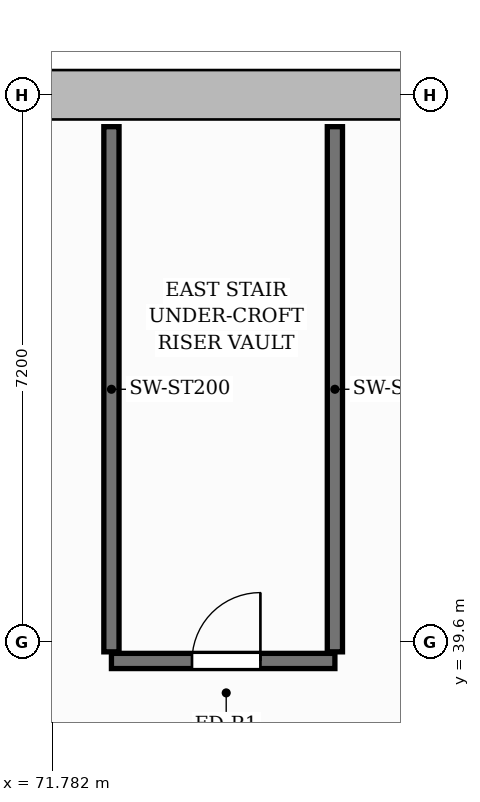
"""IFC4 building model, lengths in metres.
Left out: names, types, materials, properties, quantities, classifications, styles, units other than length and angle.
Written with IfcOpenShell. Run it as: python <this file> out.ifc"""

import sys

from ifc_helpers import new_model, si_unit, direction, frame, frame_2d, origin, place, context, subcontext, project, spatial, rectangle, extrude, source, transform, mapped, element, fill, save


model = new_model("IFC4")
c1 = context("Model", 3, precision=1e-05, world=origin(), true_north=direction((0.0, 1.0)))
c2 = subcontext(c1, "Body", "Model", "MODEL_VIEW")
j1 = project(units=[si_unit("LENGTHUNIT", "METRE"), si_unit("PLANEANGLEUNIT", "RADIAN")], contexts=[c1])
p1 = place(None, origin())
s1 = spatial("IfcSite", under=j1, at=p1, CompositionType="ELEMENT")
p2 = place(p1, origin())
s2 = spatial("IfcBuilding", under=s1, at=p2, CompositionType="ELEMENT")
p3 = place(p2, frame((0.0, 0.0, -13.0)))
s3 = spatial("IfcBuildingStorey", under=s2, at=p3, CompositionType="ELEMENT", Elevation=-13.0)
p4 = place(p3, frame((80.4, 46.8, -0.4), z_axis=(0.0, 0.0, 1.0), x_axis=(-1.0, 0.0, 0.0)))
e1 = element("IfcWall", 1, at=p4, inside=s3, PredefinedType="USERDEFINED", context=c2, shape_type="SweptSolid", body=[
    extrude(rectangle(XDim=85.2, YDim=0.65, at=frame_2d((42.6, 0.0))), origin(), (0.0, 0.0, 1.0), 6.9),
])
for number, where, z_axis, x_axis in (
    (2, (72.56, 39.47, -0.4), (0.0, 0.0, 1.0), (0.0, 1.0, 0.0)),
    (3, (75.5, 39.47, -0.4), (0.0, 0.0, 1.0), (0.0, 1.0, 0.0)),
):
    element("IfcWall", number, at=place(p3, frame(where, z_axis=z_axis, x_axis=x_axis)), inside=s3, PredefinedType="SHEAR", context=c2, shape_type="SweptSolid", body=[
        extrude(rectangle(XDim=6.91, YDim=0.2, at=frame_2d((3.455, 0.0))), origin(), (0.0, 0.0, 1.0), 6.9),
    ])
p5 = place(p3, frame((72.56, 39.35, -0.4), z_axis=(0.0, 0.0, 1.0), x_axis=(1.0, 0.0, 0.0)))
e4 = element("IfcWall", 4, at=p5, inside=s3, PredefinedType="SHEAR", context=c2, shape_type="SweptSolid", body=[
    extrude(rectangle(XDim=2.94, YDim=0.2, at=frame_2d((1.47, 0.0))), origin(), (0.0, 0.0, 1.0), 6.9),
])
p6 = place(p5, frame((1.06, 0.0, 0.4)))
e5 = element("IfcOpeningElement", 5, at=p6, cuts=e4, PredefinedType="OPENING", context=c2, shape_type="SweptSolid", body=[
    extrude(rectangle(XDim=0.9, YDim=2.1, at=frame_2d((0.45, 1.05))), frame((0.0, 0.11, 0.0), z_axis=(0.0, -1.0, 0.0), x_axis=(1.0, 0.0, 0.0)), (0.0, 0.0, 1.0), 0.22),
])
m1 = source(origin(), c2, "Body", "SweptSolid", [
    extrude(rectangle(XDim=0.9, YDim=2.1, at=frame_2d((0.45, 1.05))), frame((0.0, 0.025, 0.0), z_axis=(0.0, -1.0, 0.0), x_axis=(1.0, 0.0, 0.0)), (0.0, 0.0, 1.0), 0.05),
])
p7 = place(p6, origin())
e6 = element("IfcDoor", 6, at=p7, inside=s3, OperationType="SINGLE_SWING_RIGHT", PredefinedType="DOOR", context=c2, shape_type="MappedRepresentation", body=[
    mapped(m1, transform((0.0, 0.0, 0.0), scale=1.0)),
])
fill(e5, e6)
save(model, sys.argv[1])
